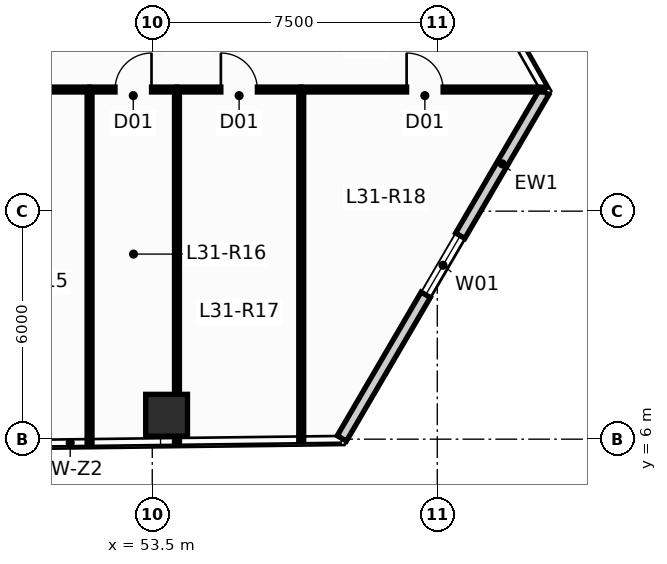
"""IFC4 building model, lengths in metres.
Left out: names, types, materials, properties, quantities, classifications, styles, units other than length and angle.
Written with IfcOpenShell. Run it as: python <this file> out.ifc"""

import sys

from ifc_helpers import new_model, si_unit, direction, frame, frame_2d, origin, origin_2d, place, context, subcontext, project, spatial, rectangle, hollow_rectangle, extrude, source, transform, mapped, element, fill, save


model = new_model("IFC4")
c1 = context("Model", 3, precision=1e-05, world=origin(), true_north=direction((0.0, 1.0)))
c2 = subcontext(c1, "Body", "Model", "MODEL_VIEW")
j1 = project(units=[si_unit("LENGTHUNIT", "METRE"), si_unit("PLANEANGLEUNIT", "RADIAN")], contexts=[c1])
p1 = place(None, origin())
s1 = spatial("IfcSite", under=j1, at=p1, CompositionType="ELEMENT")
p2 = place(p1, origin())
s2 = spatial("IfcBuilding", under=s1, at=p2, CompositionType="ELEMENT")
p3 = place(p2, frame((0.0, 0.0, 120.0)))
s3 = spatial("IfcBuildingStorey", under=s2, at=p3, CompositionType="ELEMENT", Elevation=120.0)
m1 = source(origin(), c2, "Body", "SweptSolid", [
    extrude(hollow_rectangle(XDim=1.1, YDim=1.1, WallThickness=0.06, at=origin_2d()), origin(), (0.0, 0.0, 1.0), 3.651),
])
p4 = place(p3, frame((53.877, 6.63, 0.0), z_axis=(0.013507825582, 0.019793645407, 0.999712833893), x_axis=(-0.825991119814, 0.563683129062, 0.0)))
e1 = element("IfcColumn", 1, at=p4, inside=s3, PredefinedType="COLUMN", context=c2, shape_type="MappedRepresentation", body=[
    mapped(m1, transform((0.0, 0.0, 0.0), scale=1.0)),
])
p5 = place(p3, frame((63.814, 15.135, 0.0), z_axis=(0.0, 0.0, 1.0), x_axis=(-0.504536673787, -0.863390262166, 0.0)))
e2 = element("IfcWall", 2, at=p5, inside=s3, PredefinedType="STANDARD", context=c2, shape_type="SweptSolid", body=[
    extrude(rectangle(XDim=10.556, YDim=0.28, at=frame_2d((5.278, 0.0))), origin(), (0.0, 0.0, 1.0), 3.4),
])
p6 = place(p5, frame((4.38, 0.0, 0.9)))
e3 = element("IfcOpeningElement", 3, at=p6, cuts=e2, PredefinedType="OPENING", context=c2, shape_type="SweptSolid", body=[
    extrude(rectangle(XDim=1.8, YDim=1.8, at=frame_2d((0.9, 0.9))), frame((0.0, 0.152, 0.0), z_axis=(0.0, -1.0, 0.0), x_axis=(1.0, 0.0, 0.0)), (0.0, 0.0, 1.0), 0.304),
])
p7 = place(p3, frame((51.85, 5.907, 0.0), z_axis=(0.0, 0.0, 1.0), x_axis=(0.0, 1.0, 0.0)))
e4 = element("IfcWall", 4, at=p7, inside=s3, PredefinedType="PARTITIONING", context=c2, shape_type="SweptSolid", body=[
    extrude(rectangle(XDim=9.288, YDim=0.13, at=frame_2d((4.644, 0.0))), origin(), (0.0, 0.0, 1.0), 3.4),
])
p8 = place(p3, frame((54.15, 5.936, 0.0), z_axis=(0.0, 0.0, 1.0), x_axis=(0.0, 1.0, 0.0)))
e5 = element("IfcWall", 5, at=p8, inside=s3, PredefinedType="PARTITIONING", context=c2, shape_type="SweptSolid", body=[
    extrude(rectangle(XDim=9.259, YDim=0.13, at=frame_2d((4.629, 0.0))), origin(), (0.0, 0.0, 1.0), 3.4),
])
p9 = place(p3, frame((57.42, 5.977, 0.0), z_axis=(0.0, 0.0, 1.0), x_axis=(0.0, 1.0, 0.0)))
e6 = element("IfcWall", 6, at=p9, inside=s3, PredefinedType="PARTITIONING", context=c2, shape_type="SweptSolid", body=[
    extrude(rectangle(XDim=9.218, YDim=0.13, at=frame_2d((4.609, 0.0))), origin(), (0.0, 0.0, 1.0), 3.4),
])
p10 = place(p3, frame((57.425, 15.2, 0.0), z_axis=(0.0, 0.0, 1.0), x_axis=(1.0, 0.0, 0.0)))
e7 = element("IfcWall", 7, at=p10, inside=s3, PredefinedType="PARTITIONING", context=c2, shape_type="SweptSolid", body=[
    extrude(rectangle(XDim=6.387, YDim=0.13, at=frame_2d((3.194, 0.0))), origin(), (0.0, 0.0, 1.0), 3.4),
])
p11 = place(p10, frame((2.768, 0.0, 0.0)))
e8 = element("IfcOpeningElement", 8, at=p11, cuts=e7, PredefinedType="OPENING", context=c2, shape_type="SweptSolid", body=[
    extrude(rectangle(XDim=0.96, YDim=2.15, at=frame_2d((0.48, 1.075))), frame((0.0, 0.077, 0.0), z_axis=(0.0, -1.0, 0.0), x_axis=(1.0, 0.0, 0.0)), (0.0, 0.0, 1.0), 0.154),
])
p12 = place(p3, frame((54.155, 15.2, 0.0), z_axis=(0.0, 0.0, 1.0), x_axis=(1.0, 0.0, 0.0)))
e9 = element("IfcWall", 9, at=p12, inside=s3, PredefinedType="PARTITIONING", context=c2, shape_type="SweptSolid", body=[
    extrude(rectangle(XDim=3.26, YDim=0.13, at=frame_2d((1.63, 0.0))), origin(), (0.0, 0.0, 1.0), 3.4),
])
p13 = place(p12, frame((1.15, 0.0, 0.0)))
e10 = element("IfcOpeningElement", 10, at=p13, cuts=e9, PredefinedType="OPENING", context=c2, shape_type="SweptSolid", body=[
    extrude(rectangle(XDim=0.96, YDim=2.15, at=frame_2d((0.48, 1.075))), frame((0.0, 0.077, 0.0), z_axis=(0.0, -1.0, 0.0), x_axis=(1.0, 0.0, 0.0)), (0.0, 0.0, 1.0), 0.154),
])
p14 = place(p3, frame((48.605, 15.2, 0.0), z_axis=(0.0, 0.0, 1.0), x_axis=(1.0, 0.0, 0.0)))
e11 = element("IfcWall", 11, at=p14, inside=s3, PredefinedType="PARTITIONING", context=c2, shape_type="SweptSolid", body=[
    extrude(rectangle(XDim=3.24, YDim=0.13, at=frame_2d((1.62, 0.0))), origin(), (0.0, 0.0, 1.0), 3.4),
])
p15 = place(p14, frame((1.14, 0.0, 0.0)))
e12 = element("IfcOpeningElement", 12, at=p15, cuts=e11, PredefinedType="OPENING", context=c2, shape_type="SweptSolid", body=[
    extrude(rectangle(XDim=0.96, YDim=2.15, at=frame_2d((0.48, 1.075))), frame((0.0, 0.077, 0.0), z_axis=(0.0, -1.0, 0.0), x_axis=(1.0, 0.0, 0.0)), (0.0, 0.0, 1.0), 0.154),
])
p16 = place(p3, frame((51.855, 15.2, 0.0), z_axis=(0.0, 0.0, 1.0), x_axis=(1.0, 0.0, 0.0)))
e13 = element("IfcWall", 13, at=p16, inside=s3, PredefinedType="PARTITIONING", context=c2, shape_type="SweptSolid", body=[
    extrude(rectangle(XDim=2.29, YDim=0.13, at=frame_2d((1.145, 0.0))), origin(), (0.0, 0.0, 1.0), 3.4),
])
p17 = place(p16, frame((0.665, 0.0, 0.0)))
e14 = element("IfcOpeningElement", 14, at=p17, cuts=e13, PredefinedType="OPENING", context=c2, shape_type="SweptSolid", body=[
    extrude(rectangle(XDim=0.96, YDim=2.15, at=frame_2d((0.48, 1.075))), frame((0.0, 0.077, 0.0), z_axis=(0.0, -1.0, 0.0), x_axis=(1.0, 0.0, 0.0)), (0.0, 0.0, 1.0), 0.154),
])
p18 = place(p6, origin())
e15 = element("IfcWindow", 15, at=p18, inside=s3, PartitioningType="SINGLE_PANEL", PredefinedType="WINDOW", context=c2, shape_type="SweptSolid", body=[
    extrude(rectangle(XDim=1.8, YDim=1.8, at=frame_2d((0.9, 0.9))), frame((0.0, 0.03, 0.0), z_axis=(0.0, -1.0, 0.0), x_axis=(1.0, 0.0, 0.0)), (0.0, 0.0, 1.0), 0.06),
])
fill(e3, e15)
p19 = place(p11, origin())
e16 = element("IfcDoor", 16, at=p19, inside=s3, OperationType="SINGLE_SWING_LEFT", PredefinedType="DOOR", context=c2, shape_type="SweptSolid", body=[
    extrude(rectangle(XDim=0.96, YDim=2.15, at=frame_2d((0.48, 1.075))), frame((0.0, 0.025, 0.0), z_axis=(0.0, -1.0, 0.0), x_axis=(1.0, 0.0, 0.0)), (0.0, 0.0, 1.0), 0.05),
])
fill(e8, e16)
p20 = place(p13, origin())
e17 = element("IfcDoor", 17, at=p20, inside=s3, OperationType="SINGLE_SWING_LEFT", PredefinedType="DOOR", context=c2, shape_type="SweptSolid", body=[
    extrude(rectangle(XDim=0.96, YDim=2.15, at=frame_2d((0.48, 1.075))), frame((0.0, 0.025, 0.0), z_axis=(0.0, -1.0, 0.0), x_axis=(1.0, 0.0, 0.0)), (0.0, 0.0, 1.0), 0.05),
])
fill(e10, e17)
p21 = place(p17, origin())
e18 = element("IfcDoor", 18, at=p21, inside=s3, OperationType="SINGLE_SWING_RIGHT", PredefinedType="DOOR", context=c2, shape_type="SweptSolid", body=[
    extrude(rectangle(XDim=0.96, YDim=2.15, at=frame_2d((0.48, 1.075))), frame((0.0, 0.025, 0.0), z_axis=(0.0, -1.0, 0.0), x_axis=(1.0, 0.0, 0.0)), (0.0, 0.0, 1.0), 0.05),
])
fill(e14, e18)
save(model, sys.argv[1])
